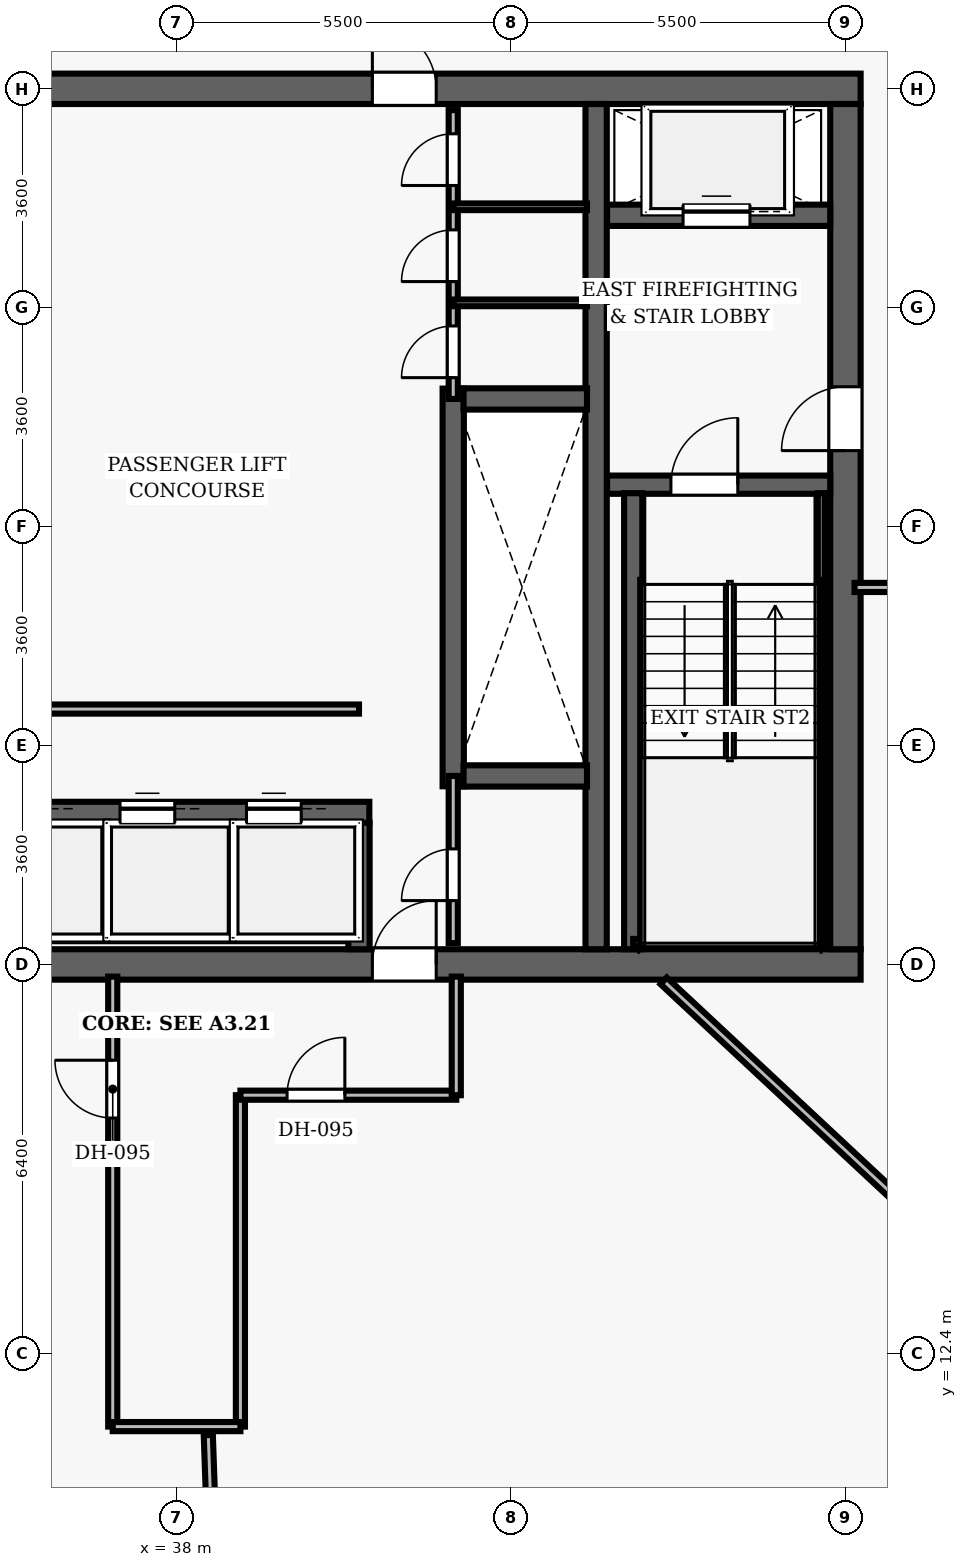
"""IFC4 building model, lengths in metres.
Left out: names, types, materials, properties, quantities, classifications, styles, units other than length and angle.
Written with IfcOpenShell. Run it as: python <this file> out.ifc"""

import sys

from ifc_helpers import new_model, si_unit, direction, frame, frame_2d, origin, place, context, subcontext, project, spatial, rectangle, extrude, element, fill, save


model = new_model("IFC4")
c1 = context("Model", 3, precision=1e-05, world=origin(), true_north=direction((0.0, 1.0)))
c2 = subcontext(c1, "Body", "Model", "MODEL_VIEW")
j1 = project(units=[si_unit("LENGTHUNIT", "METRE"), si_unit("PLANEANGLEUNIT", "RADIAN")], contexts=[c1])
p1 = place(None, origin())
s1 = spatial("IfcSite", under=j1, at=p1, CompositionType="ELEMENT")
p2 = place(p1, origin())
s2 = spatial("IfcBuilding", under=s1, at=p2, CompositionType="ELEMENT")
p3 = place(p2, frame((0.0, 0.0, 228.95)))
s3 = spatial("IfcBuildingStorey", under=s2, at=p3, CompositionType="ELEMENT", Elevation=228.95)
p4 = place(p3, frame((26.75, 18.8, 0.0), z_axis=(0.0, 0.0, 1.0), x_axis=(1.0, 0.0, 0.0)))
e1 = element("IfcWall", 1, at=p4, inside=s3, PredefinedType="SHEAR", context=c2, shape_type="SweptSolid", body=[
    extrude(rectangle(XDim=22.5, YDim=0.5, at=frame_2d((11.25, 0.0))), origin(), (0.0, 0.0, 1.0), 3.85),
])
p5 = place(p4, frame((14.47, 0.0, 0.0)))
e2 = element("IfcOpeningElement", 2, at=p5, cuts=e1, PredefinedType="OPENING", context=c2, shape_type="SweptSolid", body=[
    extrude(rectangle(XDim=1.05, YDim=2.15, at=frame_2d((0.525, 1.075))), frame((0.0, 0.26, 0.0), z_axis=(0.0, -1.0, 0.0), x_axis=(1.0, 0.0, 0.0)), (0.0, 0.0, 1.0), 0.52),
])
p6 = place(p3, frame((26.75, 33.2, 0.0), z_axis=(0.0, 0.0, 1.0), x_axis=(1.0, 0.0, 0.0)))
e3 = element("IfcWall", 3, at=p6, inside=s3, PredefinedType="SHEAR", context=c2, shape_type="SweptSolid", body=[
    extrude(rectangle(XDim=22.5, YDim=0.5, at=frame_2d((11.25, 0.0))), origin(), (0.0, 0.0, 1.0), 3.85),
])
p7 = place(p6, frame((4.57, 0.0, 0.0)))
e4 = element("IfcOpeningElement", 4, at=p7, cuts=e3, PredefinedType="OPENING", context=c2, shape_type="SweptSolid", body=[
    extrude(rectangle(XDim=1.05, YDim=2.15, at=frame_2d((0.525, 1.075))), frame((0.0, 0.26, 0.0), z_axis=(0.0, -1.0, 0.0), x_axis=(1.0, 0.0, 0.0)), (0.0, 0.0, 1.0), 0.52),
])
p8 = place(p6, frame((14.47, 0.0, 0.0)))
e5 = element("IfcOpeningElement", 5, at=p8, cuts=e3, PredefinedType="OPENING", context=c2, shape_type="SweptSolid", body=[
    extrude(rectangle(XDim=1.05, YDim=2.15, at=frame_2d((0.525, 1.075))), frame((0.0, 0.26, 0.0), z_axis=(0.0, -1.0, 0.0), x_axis=(1.0, 0.0, 0.0)), (0.0, 0.0, 1.0), 0.52),
])
p9 = place(p3, frame((49.0, 19.05, 0.0), z_axis=(0.0, 0.0, 1.0), x_axis=(0.0, 1.0, 0.0)))
e6 = element("IfcWall", 6, at=p9, inside=s3, PredefinedType="SHEAR", context=c2, shape_type="SweptSolid", body=[
    extrude(rectangle(XDim=13.9, YDim=0.5, at=frame_2d((6.95, 0.0))), origin(), (0.0, 0.0, 1.0), 3.85),
])
p10 = place(p9, frame((8.2, 0.0, 0.0)))
e7 = element("IfcOpeningElement", 7, at=p10, cuts=e6, PredefinedType="OPENING", context=c2, shape_type="SweptSolid", body=[
    extrude(rectangle(XDim=1.05, YDim=2.15, at=frame_2d((0.525, 1.075))), frame((0.0, 0.26, 0.0), z_axis=(0.0, -1.0, 0.0), x_axis=(1.0, 0.0, 0.0)), (0.0, 0.0, 1.0), 0.52),
])
p11 = place(p3, frame((44.9, 19.05, 0.0), z_axis=(0.0, 0.0, 1.0), x_axis=(0.0, 1.0, 0.0)))
e8 = element("IfcWall", 8, at=p11, inside=s3, PredefinedType="SHEAR", context=c2, shape_type="SweptSolid", body=[
    extrude(rectangle(XDim=13.9, YDim=0.35, at=frame_2d((6.95, 0.0))), origin(), (0.0, 0.0, 1.0), 3.85),
])
p12 = place(p3, frame((45.08, 26.69, 0.0), z_axis=(0.0, 0.0, 1.0), x_axis=(1.0, 0.0, 0.0)))
e9 = element("IfcWall", 9, at=p12, inside=s3, PredefinedType="SHEAR", context=c2, shape_type="SweptSolid", body=[
    extrude(rectangle(XDim=3.67, YDim=0.3, at=frame_2d((1.835, 0.0))), origin(), (0.0, 0.0, 1.0), 3.85),
])
p13 = place(p12, frame((1.05, 0.0, 0.0)))
e10 = element("IfcOpeningElement", 10, at=p13, cuts=e9, PredefinedType="OPENING", context=c2, shape_type="SweptSolid", body=[
    extrude(rectangle(XDim=1.1, YDim=2.15, at=frame_2d((0.55, 1.075))), frame((0.0, 0.16, 0.0), z_axis=(0.0, -1.0, 0.0), x_axis=(1.0, 0.0, 0.0)), (0.0, 0.0, 1.0), 0.32),
])
p14 = place(p3, frame((45.51, 19.05, 0.0), z_axis=(0.0, 0.0, 1.0), x_axis=(0.0, 1.0, 0.0)))
e11 = element("IfcWall", 11, at=p14, inside=s3, PredefinedType="SHEAR", context=c2, shape_type="SweptSolid", body=[
    extrude(rectangle(XDim=7.5, YDim=0.3, at=frame_2d((3.75, 0.0))), origin(), (0.0, 0.0, 1.0), 3.85),
])
p15 = place(p3, frame((48.605, 19.1, 0.0), z_axis=(0.0, 0.0, 1.0), x_axis=(0.0, 1.0, 0.0)))
e12 = element("IfcWall", 12, at=p15, inside=s3, PredefinedType="SHEAR", context=c2, shape_type="SweptSolid", body=[
    extrude(rectangle(XDim=7.45, YDim=0.12, at=frame_2d((3.725, 0.0))), origin(), (0.0, 0.0, 1.0), 3.85),
])
p16 = place(p3, frame((45.51, 19.16, 0.0), z_axis=(0.0, 0.0, 1.0), x_axis=(1.0, 0.0, 0.0)))
e13 = element("IfcWall", 13, at=p16, inside=s3, PredefinedType="SHEAR", context=c2, shape_type="SweptSolid", body=[
    extrude(rectangle(XDim=3.095, YDim=0.12, at=frame_2d((1.547, 0.0))), origin(), (0.0, 0.0, 1.0), 3.85),
])
p17 = place(p3, frame((45.08, 31.12, 0.0), z_axis=(0.0, 0.0, 1.0), x_axis=(1.0, 0.0, 0.0)))
e14 = element("IfcWall", 14, at=p17, inside=s3, PredefinedType="SHEAR", context=c2, shape_type="SweptSolid", body=[
    extrude(rectangle(XDim=3.67, YDim=0.35, at=frame_2d((1.835, 0.0))), origin(), (0.0, 0.0, 1.0), 3.035),
])
p18 = place(p17, frame((1.25, 0.0, 0.0)))
e15 = element("IfcOpeningElement", 15, at=p18, cuts=e14, PredefinedType="OPENING", context=c2, shape_type="SweptSolid", body=[
    extrude(rectangle(XDim=1.1, YDim=2.15, at=frame_2d((0.55, 1.075))), frame((0.0, 0.185, 0.0), z_axis=(0.0, -1.0, 0.0), x_axis=(1.0, 0.0, 0.0)), (0.0, 0.0, 1.0), 0.37),
])
p19 = place(p3, frame((42.55, 21.73, 0.0), z_axis=(0.0, 0.0, 1.0), x_axis=(0.0, 1.0, 0.0)))
e16 = element("IfcWall", 16, at=p19, inside=s3, PredefinedType="SHEAR", context=c2, shape_type="SweptSolid", body=[
    extrude(rectangle(XDim=6.54, YDim=0.35, at=frame_2d((3.27, 0.0))), origin(), (0.0, 0.0, 1.0), 3.035),
])
for number, where, z_axis, x_axis in (
    (17, (42.72, 21.9, 0.0), (0.0, 0.0, 1.0), (1.0, 0.0, 0.0)),
    (18, (42.72, 28.1, 0.0), (0.0, 0.0, 1.0), (1.0, 0.0, 0.0)),
):
    element("IfcWall", number, at=place(p3, frame(where, z_axis=z_axis, x_axis=x_axis)), inside=s3, PredefinedType="SHEAR", context=c2, shape_type="SweptSolid", body=[
        extrude(rectangle(XDim=2.03, YDim=0.35, at=frame_2d((1.015, 0.0))), origin(), (0.0, 0.0, 1.0), 3.035),
    ])
p20 = place(p3, frame((34.49, 21.3, 0.0), z_axis=(0.0, 0.0, 1.0), x_axis=(1.0, 0.0, 0.0)))
e19 = element("IfcWall", 19, at=p20, inside=s3, PredefinedType="SHEAR", context=c2, shape_type="SweptSolid", body=[
    extrude(rectangle(XDim=6.68, YDim=0.35, at=frame_2d((3.34, 0.0))), origin(), (0.0, 0.0, 1.0), 3.035),
])
p21 = place(p20, frame((0.5, 0.0, 0.0)))
e20 = element("IfcOpeningElement", 20, at=p21, cuts=e19, PredefinedType="OPENING", context=c2, shape_type="SweptSolid", body=[
    extrude(rectangle(XDim=0.9, YDim=2.15, at=frame_2d((0.45, 1.075))), frame((0.0, 0.185, 0.0), z_axis=(0.0, -1.0, 0.0), x_axis=(1.0, 0.0, 0.0)), (0.0, 0.0, 1.0), 0.37),
])
p22 = place(p20, frame((2.58, 0.0, 0.0)))
e21 = element("IfcOpeningElement", 21, at=p22, cuts=e19, PredefinedType="OPENING", context=c2, shape_type="SweptSolid", body=[
    extrude(rectangle(XDim=0.9, YDim=2.15, at=frame_2d((0.45, 1.075))), frame((0.0, 0.185, 0.0), z_axis=(0.0, -1.0, 0.0), x_axis=(1.0, 0.0, 0.0)), (0.0, 0.0, 1.0), 0.37),
])
p23 = place(p20, frame((4.66, 0.0, 0.0)))
e22 = element("IfcOpeningElement", 22, at=p23, cuts=e19, PredefinedType="OPENING", context=c2, shape_type="SweptSolid", body=[
    extrude(rectangle(XDim=0.9, YDim=2.15, at=frame_2d((0.45, 1.075))), frame((0.0, 0.185, 0.0), z_axis=(0.0, -1.0, 0.0), x_axis=(1.0, 0.0, 0.0)), (0.0, 0.0, 1.0), 0.37),
])
p24 = place(p3, frame((41.0, 19.05, 0.0), z_axis=(0.0, 0.0, 1.0), x_axis=(0.0, 1.0, 0.0)))
e23 = element("IfcWall", 23, at=p24, inside=s3, PredefinedType="SHEAR", context=c2, shape_type="SweptSolid", body=[
    extrude(rectangle(XDim=2.08, YDim=0.35, at=frame_2d((1.04, 0.0))), origin(), (0.0, 0.0, 1.0), 3.035),
])
p25 = place(p3, frame((34.75, 23.0, 0.0), z_axis=(0.0, 0.0, 1.0), x_axis=(1.0, 0.0, 0.0)))
e24 = element("IfcWall", 24, at=p25, inside=s3, PredefinedType="PARTITIONING", context=c2, shape_type="SweptSolid", body=[
    extrude(rectangle(XDim=6.25, YDim=0.15, at=frame_2d((3.125, 0.0))), origin(), (0.0, 0.0, 1.0), 3.035),
])
p26 = place(p3, frame((42.55, 28.1, 0.0), z_axis=(0.0, 0.0, 1.0), x_axis=(0.0, 1.0, 0.0)))
e25 = element("IfcWall", 25, at=p26, inside=s3, PredefinedType="PARTITIONING", context=c2, shape_type="SweptSolid", body=[
    extrude(rectangle(XDim=4.75, YDim=0.15, at=frame_2d((2.375, 0.0))), origin(), (0.0, 0.0, 1.0), 3.035),
])
p27 = place(p26, frame((0.35, 0.0, 0.0)))
e26 = element("IfcOpeningElement", 26, at=p27, cuts=e25, PredefinedType="OPENING", context=c2, shape_type="SweptSolid", body=[
    extrude(rectangle(XDim=0.85, YDim=2.1, at=frame_2d((0.425, 1.05))), frame((0.0, 0.085, 0.0), z_axis=(0.0, -1.0, 0.0), x_axis=(1.0, 0.0, 0.0)), (0.0, 0.0, 1.0), 0.17),
])
p28 = place(p26, frame((1.93, 0.0, 0.0)))
e27 = element("IfcOpeningElement", 27, at=p28, cuts=e25, PredefinedType="OPENING", context=c2, shape_type="SweptSolid", body=[
    extrude(rectangle(XDim=0.85, YDim=2.1, at=frame_2d((0.425, 1.05))), frame((0.0, 0.085, 0.0), z_axis=(0.0, -1.0, 0.0), x_axis=(1.0, 0.0, 0.0)), (0.0, 0.0, 1.0), 0.17),
])
p29 = place(p26, frame((3.51, 0.0, 0.0)))
e28 = element("IfcOpeningElement", 28, at=p29, cuts=e25, PredefinedType="OPENING", context=c2, shape_type="SweptSolid", body=[
    extrude(rectangle(XDim=0.85, YDim=2.1, at=frame_2d((0.425, 1.05))), frame((0.0, 0.085, 0.0), z_axis=(0.0, -1.0, 0.0), x_axis=(1.0, 0.0, 0.0)), (0.0, 0.0, 1.0), 0.17),
])
for number, where, z_axis, x_axis in (
    (29, (42.55, 29.68, 0.0), (0.0, 0.0, 1.0), (1.0, 0.0, 0.0)),
    (30, (42.55, 31.26, 0.0), (0.0, 0.0, 1.0), (1.0, 0.0, 0.0)),
):
    element("IfcWall", number, at=place(p3, frame(where, z_axis=z_axis, x_axis=x_axis)), inside=s3, PredefinedType="PARTITIONING", context=c2, shape_type="SweptSolid", body=[
        extrude(rectangle(XDim=2.2, YDim=0.11, at=frame_2d((1.1, 0.0))), origin(), (0.0, 0.0, 1.0), 3.035),
    ])
p30 = place(p3, frame((42.55, 19.15, 0.0), z_axis=(0.0, 0.0, 1.0), x_axis=(0.0, 1.0, 0.0)))
e31 = element("IfcWall", 31, at=p30, inside=s3, PredefinedType="PARTITIONING", context=c2, shape_type="SweptSolid", body=[
    extrude(rectangle(XDim=2.75, YDim=0.15, at=frame_2d((1.375, 0.0))), origin(), (0.0, 0.0, 1.0), 3.035),
])
p31 = place(p30, frame((0.7, 0.0, 0.0)))
e32 = element("IfcOpeningElement", 32, at=p31, cuts=e31, PredefinedType="OPENING", context=c2, shape_type="SweptSolid", body=[
    extrude(rectangle(XDim=0.85, YDim=2.1, at=frame_2d((0.425, 1.05))), frame((0.0, 0.085, 0.0), z_axis=(0.0, -1.0, 0.0), x_axis=(1.0, 0.0, 0.0)), (0.0, 0.0, 1.0), 0.17),
])
p32 = place(p3, frame((49.15, 25.0, 0.0), z_axis=(0.0, 0.0, 1.0), x_axis=(1.0, 0.0, 0.0)))
e33 = element("IfcWall", 33, at=p32, inside=s3, PredefinedType="PARTITIONING", context=c2, shape_type="SweptSolid", body=[
    extrude(rectangle(XDim=9.973, YDim=0.15, at=frame_2d((4.986, 0.0))), origin(), (0.0, 0.0, 1.0), 3.035),
])
p33 = place(p32, frame((2.018, 0.0, 0.0)))
e34 = element("IfcOpeningElement", 34, at=p33, cuts=e33, PredefinedType="OPENING", context=c2, shape_type="SweptSolid", body=[
    extrude(rectangle(XDim=0.95, YDim=2.15, at=frame_2d((0.475, 1.075))), frame((0.0, 0.085, 0.0), z_axis=(0.0, -1.0, 0.0), x_axis=(1.0, 0.0, 0.0)), (0.0, 0.0, 1.0), 0.17),
])
p34 = place(p3, frame((36.95, 11.2, 0.0), z_axis=(0.0, 0.0, 1.0), x_axis=(0.0, 1.0, 0.0)))
e35 = element("IfcWall", 35, at=p34, inside=s3, PredefinedType="PARTITIONING", context=c2, shape_type="SweptSolid", body=[
    extrude(rectangle(XDim=7.4, YDim=0.15, at=frame_2d((3.7, 0.0))), origin(), (0.0, 0.0, 1.0), 3.035),
])
p35 = place(p34, frame((5.075, 0.0, 0.0)))
e36 = element("IfcOpeningElement", 36, at=p35, cuts=e35, PredefinedType="OPENING", context=c2, shape_type="SweptSolid", body=[
    extrude(rectangle(XDim=0.95, YDim=2.15, at=frame_2d((0.475, 1.075))), frame((0.0, 0.085, 0.0), z_axis=(0.0, -1.0, 0.0), x_axis=(1.0, 0.0, 0.0)), (0.0, 0.0, 1.0), 0.17),
])
p36 = place(p3, frame((39.05, 11.2, 0.0), z_axis=(0.0, 0.0, 1.0), x_axis=(0.0, 1.0, 0.0)))
e37 = element("IfcWall", 37, at=p36, inside=s3, PredefinedType="PARTITIONING", context=c2, shape_type="SweptSolid", body=[
    extrude(rectangle(XDim=5.45, YDim=0.15, at=frame_2d((2.725, 0.0))), origin(), (0.0, 0.0, 1.0), 3.035),
])
p37 = place(p3, frame((39.05, 16.65, 0.0), z_axis=(0.0, 0.0, 1.0), x_axis=(1.0, 0.0, 0.0)))
e38 = element("IfcWall", 38, at=p37, inside=s3, PredefinedType="PARTITIONING", context=c2, shape_type="SweptSolid", body=[
    extrude(rectangle(XDim=3.55, YDim=0.15, at=frame_2d((1.775, 0.0))), origin(), (0.0, 0.0, 1.0), 3.035),
])
p38 = place(p37, frame((0.768, 0.0, 0.0)))
e39 = element("IfcOpeningElement", 39, at=p38, cuts=e38, PredefinedType="OPENING", context=c2, shape_type="SweptSolid", body=[
    extrude(rectangle(XDim=0.95, YDim=2.15, at=frame_2d((0.475, 1.075))), frame((0.0, 0.085, 0.0), z_axis=(0.0, -1.0, 0.0), x_axis=(1.0, 0.0, 0.0)), (0.0, 0.0, 1.0), 0.17),
])
p39 = place(p3, frame((42.6, 16.65, 0.0), z_axis=(0.0, 0.0, 1.0), x_axis=(0.0, 1.0, 0.0)))
e40 = element("IfcWall", 40, at=p39, inside=s3, PredefinedType="PARTITIONING", context=c2, shape_type="SweptSolid", body=[
    extrude(rectangle(XDim=1.95, YDim=0.15, at=frame_2d((0.975, 0.0))), origin(), (0.0, 0.0, 1.0), 3.035),
])
p40 = place(p3, frame((36.95, 11.2, 0.0), z_axis=(0.0, 0.0, 1.0), x_axis=(1.0, 0.0, 0.0)))
e41 = element("IfcWall", 41, at=p40, inside=s3, PredefinedType="PARTITIONING", context=c2, shape_type="SweptSolid", body=[
    extrude(rectangle(XDim=2.1, YDim=0.15, at=frame_2d((1.05, 0.0))), origin(), (0.0, 0.0, 1.0), 3.035),
])
p41 = place(p3, frame((38.522, 11.06, 0.0), z_axis=(0.0, 0.0, 1.0), x_axis=(0.034889926563, -0.99939116117, 0.0)))
e42 = element("IfcWall", 42, at=p41, inside=s3, PredefinedType="PARTITIONING", context=c2, shape_type="SweptSolid", body=[
    extrude(rectangle(XDim=9.517, YDim=0.15, at=frame_2d((4.758, 0.0))), origin(), (0.0, 0.0, 1.0), 3.035),
])
p42 = place(p3, frame((46.01, 18.53, 0.0), z_axis=(0.0, 0.0, 1.0), x_axis=(0.731353262769, -0.681998830671, 0.0)))
e43 = element("IfcWall", 43, at=p42, inside=s3, PredefinedType="PARTITIONING", context=c2, shape_type="SweptSolid", body=[
    extrude(rectangle(XDim=17.214, YDim=0.15, at=frame_2d((8.607, 0.0))), origin(), (0.0, 0.0, 1.0), 3.035),
])
p43 = place(p13, origin())
e44 = element("IfcDoor", 44, at=p43, inside=s3, OperationType="SINGLE_SWING_RIGHT", PredefinedType="DOOR", context=c2, shape_type="SweptSolid", body=[
    extrude(rectangle(XDim=1.1, YDim=2.15, at=frame_2d((0.55, 1.075))), frame((0.0, 0.025, 0.0), z_axis=(0.0, -1.0, 0.0), x_axis=(1.0, 0.0, 0.0)), (0.0, 0.0, 1.0), 0.05),
])
fill(e10, e44)
p44 = place(p10, origin())
e45 = element("IfcDoor", 45, at=p44, inside=s3, OperationType="SINGLE_SWING_LEFT", PredefinedType="DOOR", context=c2, shape_type="SweptSolid", body=[
    extrude(rectangle(XDim=1.05, YDim=2.15, at=frame_2d((0.525, 1.075))), frame((0.0, 0.025, 0.0), z_axis=(0.0, -1.0, 0.0), x_axis=(1.0, 0.0, 0.0)), (0.0, 0.0, 1.0), 0.05),
])
fill(e7, e45)
p45 = place(p8, origin())
e46 = element("IfcDoor", 46, at=p45, inside=s3, OperationType="SINGLE_SWING_LEFT", PredefinedType="DOOR", context=c2, shape_type="SweptSolid", body=[
    extrude(rectangle(XDim=1.05, YDim=2.15, at=frame_2d((0.525, 1.075))), frame((0.0, 0.025, 0.0), z_axis=(0.0, -1.0, 0.0), x_axis=(1.0, 0.0, 0.0)), (0.0, 0.0, 1.0), 0.05),
])
fill(e5, e46)
p46 = place(p5, origin())
e47 = element("IfcDoor", 47, at=p46, inside=s3, OperationType="SINGLE_SWING_RIGHT", PredefinedType="DOOR", context=c2, shape_type="SweptSolid", body=[
    extrude(rectangle(XDim=1.05, YDim=2.15, at=frame_2d((0.525, 1.075))), frame((0.0, 0.025, 0.0), z_axis=(0.0, -1.0, 0.0), x_axis=(1.0, 0.0, 0.0)), (0.0, 0.0, 1.0), 0.05),
])
fill(e2, e47)
p47 = place(p27, origin())
e48 = element("IfcDoor", 48, at=p47, inside=s3, OperationType="SINGLE_SWING_LEFT", PredefinedType="DOOR", context=c2, shape_type="SweptSolid", body=[
    extrude(rectangle(XDim=0.85, YDim=2.1, at=frame_2d((0.425, 1.05))), frame((0.0, 0.025, 0.0), z_axis=(0.0, -1.0, 0.0), x_axis=(1.0, 0.0, 0.0)), (0.0, 0.0, 1.0), 0.05),
])
fill(e26, e48)
p48 = place(p28, origin())
e49 = element("IfcDoor", 49, at=p48, inside=s3, OperationType="SINGLE_SWING_LEFT", PredefinedType="DOOR", context=c2, shape_type="SweptSolid", body=[
    extrude(rectangle(XDim=0.85, YDim=2.1, at=frame_2d((0.425, 1.05))), frame((0.0, 0.025, 0.0), z_axis=(0.0, -1.0, 0.0), x_axis=(1.0, 0.0, 0.0)), (0.0, 0.0, 1.0), 0.05),
])
fill(e27, e49)
p49 = place(p29, origin())
e50 = element("IfcDoor", 50, at=p49, inside=s3, OperationType="SINGLE_SWING_LEFT", PredefinedType="DOOR", context=c2, shape_type="SweptSolid", body=[
    extrude(rectangle(XDim=0.85, YDim=2.1, at=frame_2d((0.425, 1.05))), frame((0.0, 0.025, 0.0), z_axis=(0.0, -1.0, 0.0), x_axis=(1.0, 0.0, 0.0)), (0.0, 0.0, 1.0), 0.05),
])
fill(e28, e50)
p50 = place(p31, origin())
e51 = element("IfcDoor", 51, at=p50, inside=s3, OperationType="SINGLE_SWING_LEFT", PredefinedType="DOOR", context=c2, shape_type="SweptSolid", body=[
    extrude(rectangle(XDim=0.85, YDim=2.1, at=frame_2d((0.425, 1.05))), frame((0.0, 0.025, 0.0), z_axis=(0.0, -1.0, 0.0), x_axis=(1.0, 0.0, 0.0)), (0.0, 0.0, 1.0), 0.05),
])
fill(e32, e51)
p51 = place(p35, origin())
e52 = element("IfcDoor", 52, at=p51, inside=s3, OperationType="SINGLE_SWING_RIGHT", PredefinedType="DOOR", context=c2, shape_type="SweptSolid", body=[
    extrude(rectangle(XDim=0.95, YDim=2.15, at=frame_2d((0.475, 1.075))), frame((0.0, 0.025, 0.0), z_axis=(0.0, -1.0, 0.0), x_axis=(1.0, 0.0, 0.0)), (0.0, 0.0, 1.0), 0.05),
])
fill(e36, e52)
p52 = place(p38, origin())
e53 = element("IfcDoor", 53, at=p52, inside=s3, OperationType="SINGLE_SWING_RIGHT", PredefinedType="DOOR", context=c2, shape_type="SweptSolid", body=[
    extrude(rectangle(XDim=0.95, YDim=2.15, at=frame_2d((0.475, 1.075))), frame((0.0, 0.025, 0.0), z_axis=(0.0, -1.0, 0.0), x_axis=(1.0, 0.0, 0.0)), (0.0, 0.0, 1.0), 0.05),
])
fill(e39, e53)
p53 = place(p22, origin())
e54 = element("IfcDoor", 54, at=p53, inside=s3, OperationType="SLIDING_TO_LEFT", PredefinedType="DOOR", context=c2, shape_type="SweptSolid", body=[
    extrude(rectangle(XDim=0.9, YDim=2.15, at=frame_2d((0.45, 1.075))), frame((0.0, 0.025, 0.0), z_axis=(0.0, -1.0, 0.0), x_axis=(1.0, 0.0, 0.0)), (0.0, 0.0, 1.0), 0.05),
])
fill(e21, e54)
p54 = place(p23, origin())
e55 = element("IfcDoor", 55, at=p54, inside=s3, OperationType="SLIDING_TO_LEFT", PredefinedType="DOOR", context=c2, shape_type="SweptSolid", body=[
    extrude(rectangle(XDim=0.9, YDim=2.15, at=frame_2d((0.45, 1.075))), frame((0.0, 0.025, 0.0), z_axis=(0.0, -1.0, 0.0), x_axis=(1.0, 0.0, 0.0)), (0.0, 0.0, 1.0), 0.05),
])
fill(e22, e55)
p55 = place(p18, origin())
e56 = element("IfcDoor", 56, at=p55, inside=s3, OperationType="SLIDING_TO_LEFT", PredefinedType="DOOR", context=c2, shape_type="SweptSolid", body=[
    extrude(rectangle(XDim=1.1, YDim=2.15, at=frame_2d((0.55, 1.075))), frame((0.0, 0.025, 0.0), z_axis=(0.0, -1.0, 0.0), x_axis=(1.0, 0.0, 0.0)), (0.0, 0.0, 1.0), 0.05),
])
fill(e15, e56)
save(model, sys.argv[1])
